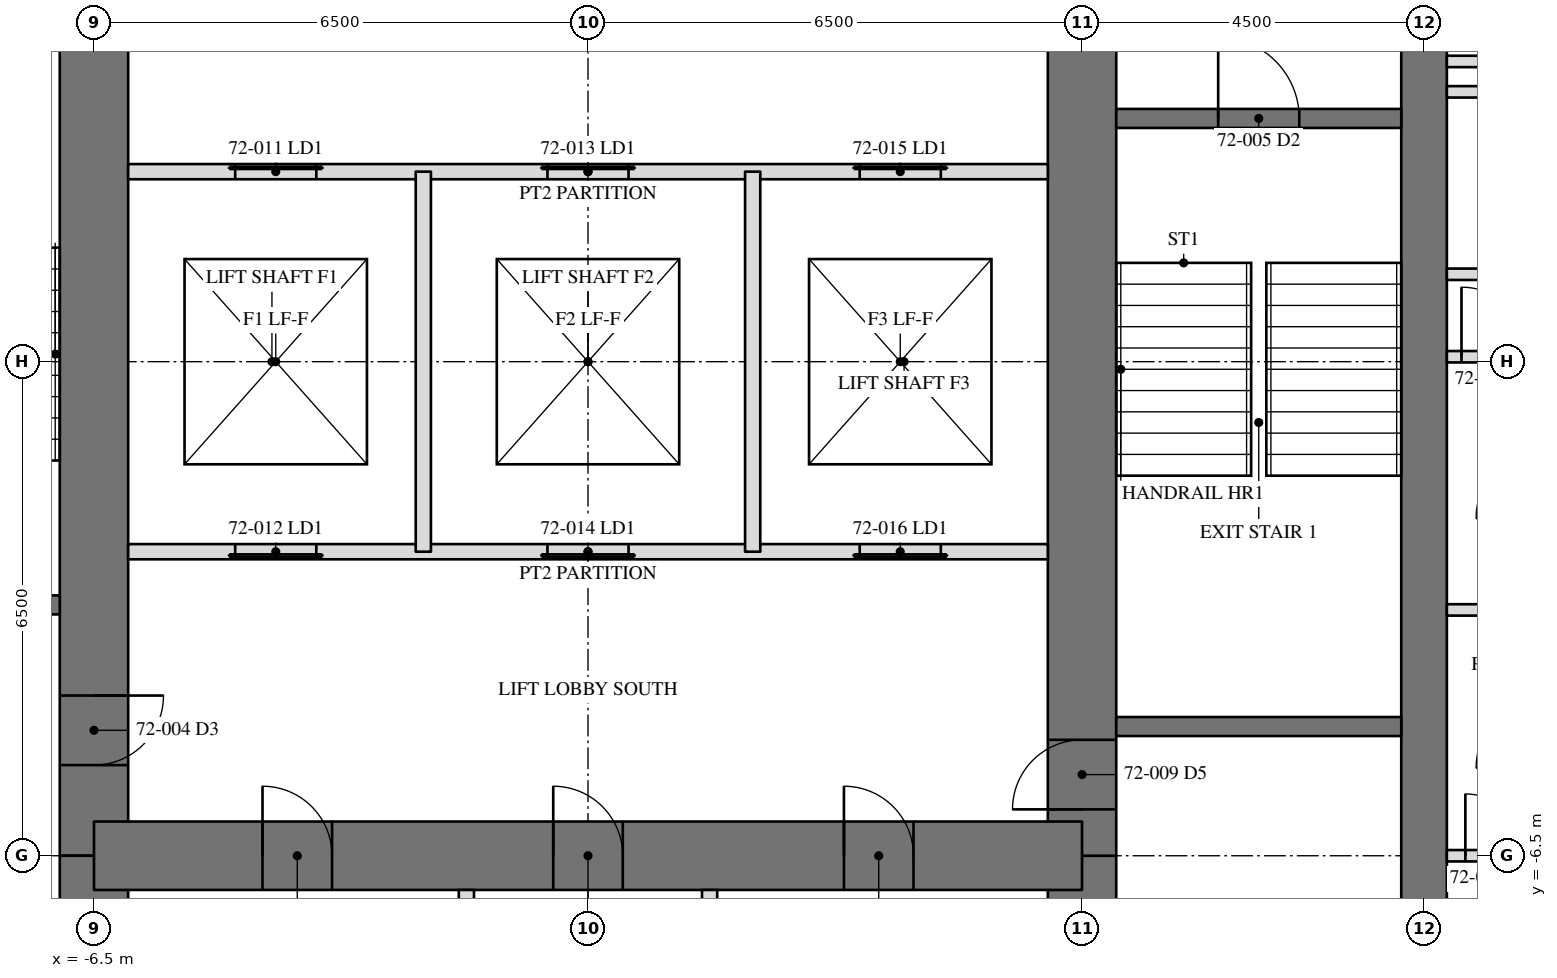
"""IFC4 building model, lengths in metres.
Left out: names, types, materials, properties, quantities, classifications, styles, units other than length and angle.
Written with IfcOpenShell. Run it as: python <this file> out.ifc"""

import sys

from ifc_helpers import new_model, si_unit, direction, frame, frame_2d, origin, place, context, subcontext, project, spatial, rectangle, extrude, element, fill, save


model = new_model("IFC4")
c1 = context("Model", 3, precision=1e-05, world=origin(), true_north=direction((0.0, 1.0)))
c2 = subcontext(c1, "Body", "Model", "MODEL_VIEW")
j1 = project(units=[si_unit("LENGTHUNIT", "METRE"), si_unit("PLANEANGLEUNIT", "RADIAN")], contexts=[c1])
p1 = place(None, origin())
s1 = spatial("IfcSite", under=j1, at=p1, CompositionType="ELEMENT")
p2 = place(p1, origin())
s2 = spatial("IfcBuilding", under=s1, at=p2, CompositionType="ELEMENT")
p3 = place(p2, frame((0.0, 0.0, 292.0)))
s3 = spatial("IfcBuildingStorey", under=s2, at=p3, CompositionType="ELEMENT", Elevation=292.0)
p4 = place(p3, frame((11.0, -11.0, 0.0), z_axis=(0.0, 0.0, 1.0), x_axis=(0.0, 1.0, 0.0)))
e1 = element("IfcWall", 1, at=p4, inside=s3, PredefinedType="SHEAR", context=c2, shape_type="SweptSolid", body=[
    extrude(rectangle(XDim=22.0, YDim=0.6, at=frame_2d((11.0, 0.0))), origin(), (0.0, 0.0, 1.0), 3.6),
])
p5 = place(p4, frame((15.393, 0.0, 0.0)))
e2 = element("IfcOpeningElement", 2, at=p5, cuts=e1, PredefinedType="OPENING", context=c2, shape_type="SweptSolid", body=[
    extrude(rectangle(XDim=0.915, YDim=2.134, at=frame_2d((0.458, 1.067))), frame((0.0, 0.31, 0.0), z_axis=(0.0, -1.0, 0.0), x_axis=(1.0, 0.0, 0.0)), (0.0, 0.0, 1.0), 0.62),
])
p6 = place(p3, frame((6.5, -11.0, 0.0), z_axis=(0.0, 0.0, 1.0), x_axis=(0.0, 1.0, 0.0)))
e3 = element("IfcWall", 3, at=p6, inside=s3, PredefinedType="SHEAR", context=c2, shape_type="SweptSolid", body=[
    extrude(rectangle(XDim=4.5, YDim=0.9, at=frame_2d((2.25, 0.0))), origin(), (0.0, 0.0, 1.0), 3.6),
])
p7 = place(p3, frame((6.5, -6.5, 0.0), z_axis=(0.0, 0.0, 1.0), x_axis=(0.0, 1.0, 0.0)))
e4 = element("IfcWall", 4, at=p7, inside=s3, PredefinedType="SHEAR", context=c2, shape_type="SweptSolid", body=[
    extrude(rectangle(XDim=13.0, YDim=0.9, at=frame_2d((6.5, 0.0))), origin(), (0.0, 0.0, 1.0), 3.6),
])
p8 = place(p7, frame((10.893, 0.0, 0.0)))
e5 = element("IfcOpeningElement", 5, at=p8, cuts=e4, PredefinedType="OPENING", context=c2, shape_type="SweptSolid", body=[
    extrude(rectangle(XDim=0.915, YDim=2.134, at=frame_2d((0.458, 1.067))), frame((0.0, 0.46, 0.0), z_axis=(0.0, -1.0, 0.0), x_axis=(1.0, 0.0, 0.0)), (0.0, 0.0, 1.0), 0.92),
])
p9 = place(p7, frame((0.61, 0.0, 0.0)))
e6 = element("IfcOpeningElement", 6, at=p9, cuts=e4, PredefinedType="OPENING", context=c2, shape_type="SweptSolid", body=[
    extrude(rectangle(XDim=0.915, YDim=2.134, at=frame_2d((0.458, 1.067))), frame((0.0, 0.46, 0.0), z_axis=(0.0, -1.0, 0.0), x_axis=(1.0, 0.0, 0.0)), (0.0, 0.0, 1.0), 0.92),
])
p10 = place(p3, frame((-6.5, 6.5, 0.0), z_axis=(0.0, 0.0, 1.0), x_axis=(0.0, -1.0, 0.0)))
e7 = element("IfcWall", 7, at=p10, inside=s3, PredefinedType="SHEAR", context=c2, shape_type="SweptSolid", body=[
    extrude(rectangle(XDim=13.0, YDim=0.9, at=frame_2d((6.5, 0.0))), origin(), (0.0, 0.0, 1.0), 3.6),
])
p11 = place(p10, frame((10.893, 0.0, 0.0)))
e8 = element("IfcOpeningElement", 8, at=p11, cuts=e7, PredefinedType="OPENING", context=c2, shape_type="SweptSolid", body=[
    extrude(rectangle(XDim=0.915, YDim=2.134, at=frame_2d((0.458, 1.067))), frame((0.0, 0.46, 0.0), z_axis=(0.0, -1.0, 0.0), x_axis=(1.0, 0.0, 0.0)), (0.0, 0.0, 1.0), 0.92),
])
p12 = place(p10, frame((0.61, 0.0, 0.0)))
e9 = element("IfcOpeningElement", 9, at=p12, cuts=e7, PredefinedType="OPENING", context=c2, shape_type="SweptSolid", body=[
    extrude(rectangle(XDim=0.915, YDim=2.134, at=frame_2d((0.458, 1.067))), frame((0.0, 0.46, 0.0), z_axis=(0.0, -1.0, 0.0), x_axis=(1.0, 0.0, 0.0)), (0.0, 0.0, 1.0), 0.92),
])
p13 = place(p3, frame((-6.5, -6.5, 0.0), z_axis=(0.0, 0.0, 1.0), x_axis=(0.0, -1.0, 0.0)))
e10 = element("IfcWall", 10, at=p13, inside=s3, PredefinedType="SHEAR", context=c2, shape_type="SweptSolid", body=[
    extrude(rectangle(XDim=4.5, YDim=0.9, at=frame_2d((2.25, 0.0))), origin(), (0.0, 0.0, 1.0), 3.6),
])
p14 = place(p3, frame((-6.5, -6.5, 0.0), z_axis=(0.0, 0.0, 1.0), x_axis=(1.0, 0.0, 0.0)))
e11 = element("IfcWall", 11, at=p14, inside=s3, PredefinedType="SHEAR", context=c2, shape_type="SweptSolid", body=[
    extrude(rectangle(XDim=13.0, YDim=0.9, at=frame_2d((6.5, 0.0))), origin(), (0.0, 0.0, 1.0), 3.6),
])
p15 = place(p14, frame((6.042, 0.0, 0.0)))
e12 = element("IfcOpeningElement", 12, at=p15, cuts=e11, PredefinedType="OPENING", context=c2, shape_type="SweptSolid", body=[
    extrude(rectangle(XDim=0.915, YDim=2.134, at=frame_2d((0.458, 1.067))), frame((0.0, 0.46, 0.0), z_axis=(0.0, -1.0, 0.0), x_axis=(1.0, 0.0, 0.0)), (0.0, 0.0, 1.0), 0.92),
])
p16 = place(p14, frame((2.218, 0.0, 0.0)))
e13 = element("IfcOpeningElement", 13, at=p16, cuts=e11, PredefinedType="OPENING", context=c2, shape_type="SweptSolid", body=[
    extrude(rectangle(XDim=0.915, YDim=2.134, at=frame_2d((0.458, 1.067))), frame((0.0, 0.46, 0.0), z_axis=(0.0, -1.0, 0.0), x_axis=(1.0, 0.0, 0.0)), (0.0, 0.0, 1.0), 0.92),
])
p17 = place(p14, frame((9.867, 0.0, 0.0)))
e14 = element("IfcOpeningElement", 14, at=p17, cuts=e11, PredefinedType="OPENING", context=c2, shape_type="SweptSolid", body=[
    extrude(rectangle(XDim=0.915, YDim=2.134, at=frame_2d((0.458, 1.067))), frame((0.0, 0.46, 0.0), z_axis=(0.0, -1.0, 0.0), x_axis=(1.0, 0.0, 0.0)), (0.0, 0.0, 1.0), 0.92),
])
p18 = place(p3, frame((6.95, -4.8, 0.0), z_axis=(0.0, 0.0, 1.0), x_axis=(1.0, 0.0, 0.0)))
e15 = element("IfcWall", 15, at=p18, inside=s3, PredefinedType="SOLIDWALL", context=c2, shape_type="SweptSolid", body=[
    extrude(rectangle(XDim=3.75, YDim=0.25, at=frame_2d((1.875, 0.0))), origin(), (0.0, 0.0, 1.0), 3.41),
])
p19 = place(p3, frame((6.95, 3.2, 0.0), z_axis=(0.0, 0.0, 1.0), x_axis=(1.0, 0.0, 0.0)))
e16 = element("IfcWall", 16, at=p19, inside=s3, PredefinedType="SOLIDWALL", context=c2, shape_type="SweptSolid", body=[
    extrude(rectangle(XDim=3.75, YDim=0.25, at=frame_2d((1.875, 0.0))), origin(), (0.0, 0.0, 1.0), 3.41),
])
p20 = place(p19, frame((1.342, 0.0, 0.0)))
e17 = element("IfcOpeningElement", 17, at=p20, cuts=e16, PredefinedType="OPENING", context=c2, shape_type="SweptSolid", body=[
    extrude(rectangle(XDim=1.067, YDim=2.134, at=frame_2d((0.533, 1.067))), frame((0.0, 0.135, 0.0), z_axis=(0.0, -1.0, 0.0), x_axis=(1.0, 0.0, 0.0)), (0.0, 0.0, 1.0), 0.27),
])
p21 = place(p3, frame((-6.95, -3.2, 0.0), z_axis=(0.0, 0.0, 1.0), x_axis=(-1.0, 0.0, 0.0)))
e18 = element("IfcWall", 18, at=p21, inside=s3, PredefinedType="SOLIDWALL", context=c2, shape_type="SweptSolid", body=[
    extrude(rectangle(XDim=3.75, YDim=0.25, at=frame_2d((1.875, 0.0))), origin(), (0.0, 0.0, 1.0), 3.41),
])
p22 = place(p21, frame((1.342, 0.0, 0.0)))
e19 = element("IfcOpeningElement", 19, at=p22, cuts=e18, PredefinedType="OPENING", context=c2, shape_type="SweptSolid", body=[
    extrude(rectangle(XDim=1.067, YDim=2.134, at=frame_2d((0.533, 1.067))), frame((0.0, 0.135, 0.0), z_axis=(0.0, -1.0, 0.0), x_axis=(1.0, 0.0, 0.0)), (0.0, 0.0, 1.0), 0.27),
])
p23 = place(p3, frame((-6.05, 2.5, 0.0), z_axis=(0.0, 0.0, 1.0), x_axis=(1.0, 0.0, 0.0)))
e20 = element("IfcWall", 20, at=p23, inside=s3, PredefinedType="PARTITIONING", context=c2, shape_type="SweptSolid", body=[
    extrude(rectangle(XDim=12.1, YDim=0.2, at=frame_2d((6.05, 0.0))), origin(), (0.0, 0.0, 1.0), 3.41),
])
p24 = place(p23, frame((1.408, 0.0, 0.0)))
e21 = element("IfcOpeningElement", 21, at=p24, cuts=e20, PredefinedType="OPENING", context=c2, shape_type="SweptSolid", body=[
    extrude(rectangle(XDim=1.067, YDim=2.134, at=frame_2d((0.533, 1.067))), frame((0.0, 0.11, 0.0), z_axis=(0.0, -1.0, 0.0), x_axis=(1.0, 0.0, 0.0)), (0.0, 0.0, 1.0), 0.22),
])
p25 = place(p23, frame((5.517, 0.0, 0.0)))
e22 = element("IfcOpeningElement", 22, at=p25, cuts=e20, PredefinedType="OPENING", context=c2, shape_type="SweptSolid", body=[
    extrude(rectangle(XDim=1.067, YDim=2.134, at=frame_2d((0.533, 1.067))), frame((0.0, 0.11, 0.0), z_axis=(0.0, -1.0, 0.0), x_axis=(1.0, 0.0, 0.0)), (0.0, 0.0, 1.0), 0.22),
])
p26 = place(p23, frame((9.625, 0.0, 0.0)))
e23 = element("IfcOpeningElement", 23, at=p26, cuts=e20, PredefinedType="OPENING", context=c2, shape_type="SweptSolid", body=[
    extrude(rectangle(XDim=1.067, YDim=2.134, at=frame_2d((0.533, 1.067))), frame((0.0, 0.11, 0.0), z_axis=(0.0, -1.0, 0.0), x_axis=(1.0, 0.0, 0.0)), (0.0, 0.0, 1.0), 0.22),
])
p27 = place(p3, frame((6.05, -2.5, 0.0), z_axis=(0.0, 0.0, 1.0), x_axis=(-1.0, 0.0, 0.0)))
e24 = element("IfcWall", 24, at=p27, inside=s3, PredefinedType="PARTITIONING", context=c2, shape_type="SweptSolid", body=[
    extrude(rectangle(XDim=12.1, YDim=0.2, at=frame_2d((6.05, 0.0))), origin(), (0.0, 0.0, 1.0), 3.41),
])
p28 = place(p27, frame((9.625, 0.0, 0.0)))
e25 = element("IfcOpeningElement", 25, at=p28, cuts=e24, PredefinedType="OPENING", context=c2, shape_type="SweptSolid", body=[
    extrude(rectangle(XDim=1.067, YDim=2.134, at=frame_2d((0.533, 1.067))), frame((0.0, 0.11, 0.0), z_axis=(0.0, -1.0, 0.0), x_axis=(1.0, 0.0, 0.0)), (0.0, 0.0, 1.0), 0.22),
])
p29 = place(p27, frame((5.517, 0.0, 0.0)))
e26 = element("IfcOpeningElement", 26, at=p29, cuts=e24, PredefinedType="OPENING", context=c2, shape_type="SweptSolid", body=[
    extrude(rectangle(XDim=1.067, YDim=2.134, at=frame_2d((0.533, 1.067))), frame((0.0, 0.11, 0.0), z_axis=(0.0, -1.0, 0.0), x_axis=(1.0, 0.0, 0.0)), (0.0, 0.0, 1.0), 0.22),
])
p30 = place(p27, frame((1.408, 0.0, 0.0)))
e27 = element("IfcOpeningElement", 27, at=p30, cuts=e24, PredefinedType="OPENING", context=c2, shape_type="SweptSolid", body=[
    extrude(rectangle(XDim=1.067, YDim=2.134, at=frame_2d((0.533, 1.067))), frame((0.0, 0.11, 0.0), z_axis=(0.0, -1.0, 0.0), x_axis=(1.0, 0.0, 0.0)), (0.0, 0.0, 1.0), 0.22),
])
for number, where, z_axis, x_axis in (
    (28, (-2.167, -2.5, 0.0), (0.0, 0.0, 1.0), (0.0, 1.0, 0.0)),
    (29, (2.167, -2.5, 0.0), (0.0, 0.0, 1.0), (0.0, 1.0, 0.0)),
):
    element("IfcWall", number, at=place(p3, frame(where, z_axis=z_axis, x_axis=x_axis)), inside=s3, PredefinedType="PARTITIONING", context=c2, shape_type="SweptSolid", body=[
        extrude(rectangle(XDim=5.0, YDim=0.2, at=frame_2d((2.5, 0.0))), origin(), (0.0, 0.0, 1.0), 3.41),
    ])
for number, where, z_axis, x_axis in (
    (30, (-1.6, -6.95, 0.0), (0.0, 0.0, 1.0), (0.0, -1.0, 0.0)),
    (31, (1.6, -6.95, 0.0), (0.0, 0.0, 1.0), (0.0, -1.0, 0.0)),
):
    element("IfcWall", number, at=place(p3, frame(where, z_axis=z_axis, x_axis=x_axis)), inside=s3, PredefinedType="PARTITIONING", context=c2, shape_type="SweptSolid", body=[
        extrude(rectangle(XDim=3.75, YDim=0.2, at=frame_2d((1.875, 0.0))), origin(), (0.0, 0.0, 1.0), 3.41),
    ])
p31 = place(p3, frame((11.3, -6.5, 0.0), z_axis=(0.0, 0.0, 1.0), x_axis=(1.0, 0.0, 0.0)))
e32 = element("IfcWall", 32, at=p31, inside=s3, PredefinedType="PARTITIONING", context=c2, shape_type="SweptSolid", body=[
    extrude(rectangle(XDim=5.615, YDim=0.15, at=frame_2d((2.808, 0.0))), origin(), (0.0, 0.0, 1.0), 2.966),
])
p32 = place(p31, frame((0.243, 0.0, 0.0)))
e33 = element("IfcOpeningElement", 33, at=p32, cuts=e32, PredefinedType="OPENING", context=c2, shape_type="SweptSolid", body=[
    extrude(rectangle(XDim=0.813, YDim=2.032, at=frame_2d((0.406, 1.016))), frame((0.0, 0.085, 0.0), z_axis=(0.0, -1.0, 0.0), x_axis=(1.0, 0.0, 0.0)), (0.0, 0.0, 1.0), 0.17),
])
p33 = place(p31, frame((2.742, 0.0, 0.0)))
e34 = element("IfcOpeningElement", 34, at=p33, cuts=e32, PredefinedType="OPENING", context=c2, shape_type="SweptSolid", body=[
    extrude(rectangle(XDim=0.915, YDim=2.134, at=frame_2d((0.458, 1.067))), frame((0.0, 0.085, 0.0), z_axis=(0.0, -1.0, 0.0), x_axis=(1.0, 0.0, 0.0)), (0.0, 0.0, 1.0), 0.17),
])
p34 = place(p3, frame((11.3, -3.266, 0.0), z_axis=(0.0, 0.0, 1.0), x_axis=(1.0, 0.0, 0.0)))
e35 = element("IfcWall", 35, at=p34, inside=s3, PredefinedType="PARTITIONING", context=c2, shape_type="SweptSolid", body=[
    extrude(rectangle(XDim=5.615, YDim=0.15, at=frame_2d((2.808, 0.0))), origin(), (0.0, 0.0, 1.0), 2.709),
])
p35 = place(p3, frame((11.3, 0.065, 0.0), z_axis=(0.0, 0.0, 1.0), x_axis=(1.0, 0.0, 0.0)))
e36 = element("IfcWall", 36, at=p35, inside=s3, PredefinedType="PARTITIONING", context=c2, shape_type="SweptSolid", body=[
    extrude(rectangle(XDim=5.615, YDim=0.15, at=frame_2d((2.808, 0.0))), origin(), (0.0, 0.0, 1.0), 2.709),
])
p36 = place(p35, frame((0.192, 0.0, 0.0)))
e37 = element("IfcOpeningElement", 37, at=p36, cuts=e36, PredefinedType="OPENING", context=c2, shape_type="SweptSolid", body=[
    extrude(rectangle(XDim=0.915, YDim=2.134, at=frame_2d((0.458, 1.067))), frame((0.0, 0.085, 0.0), z_axis=(0.0, -1.0, 0.0), x_axis=(1.0, 0.0, 0.0)), (0.0, 0.0, 1.0), 0.17),
])
p37 = place(p3, frame((11.3, 3.95, 0.0), z_axis=(0.0, 0.0, 1.0), x_axis=(1.0, 0.0, 0.0)))
e38 = element("IfcWall", 38, at=p37, inside=s3, PredefinedType="PARTITIONING", context=c2, shape_type="SweptSolid", body=[
    extrude(rectangle(XDim=1.525, YDim=0.15, at=frame_2d((0.762, 0.0))), origin(), (0.0, 0.0, 1.0), 3.41),
])
for number, where, z_axis, x_axis in (
    (39, (11.3, 1.15, 0.0), (0.0, 0.0, 1.0), (1.0, 0.0, 0.0)),
    (40, (11.3, 3.55, 0.0), (0.0, 0.0, 1.0), (1.0, 0.0, 0.0)),
):
    element("IfcWall", number, at=place(p3, frame(where, z_axis=z_axis, x_axis=x_axis)), inside=s3, PredefinedType="PARTITIONING", context=c2, shape_type="SweptSolid", body=[
        extrude(rectangle(XDim=2.725, YDim=0.15, at=frame_2d((1.362, 0.0))), origin(), (0.0, 0.0, 1.0), 3.41),
    ])
p38 = place(p11, origin())
e41 = element("IfcDoor", 41, at=p38, inside=s3, OperationType="SINGLE_SWING_RIGHT", PredefinedType="DOOR", context=c2, shape_type="SweptSolid", body=[
    extrude(rectangle(XDim=0.915, YDim=2.134, at=frame_2d((0.458, 1.067))), frame((0.0, -0.375, 0.0), z_axis=(0.0, -1.0, 0.0), x_axis=(1.0, 0.0, 0.0)), (0.0, 0.0, 1.0), 0.05),
])
fill(e8, e41)
p39 = place(p20, origin())
e42 = element("IfcDoor", 42, at=p39, inside=s3, OperationType="SINGLE_SWING_LEFT", PredefinedType="DOOR", context=c2, shape_type="SweptSolid", body=[
    extrude(rectangle(XDim=1.067, YDim=2.134, at=frame_2d((0.533, 1.067))), frame((0.0, 0.025, 0.0), z_axis=(0.0, -1.0, 0.0), x_axis=(1.0, 0.0, 0.0)), (0.0, 0.0, 1.0), 0.05),
])
fill(e17, e42)
p40 = place(p9, origin())
e43 = element("IfcDoor", 43, at=p40, inside=s3, OperationType="SINGLE_SWING_RIGHT", PredefinedType="DOOR", context=c2, shape_type="SweptSolid", body=[
    extrude(rectangle(XDim=0.915, YDim=2.134, at=frame_2d((0.458, 1.067))), frame((0.0, -0.375, 0.0), z_axis=(0.0, -1.0, 0.0), x_axis=(1.0, 0.0, 0.0)), (0.0, 0.0, 1.0), 0.05),
])
fill(e6, e43)
p41 = place(p24, origin())
e44 = element("IfcDoor", 44, at=p41, inside=s3, OperationType="SLIDING_TO_LEFT", PredefinedType="DOOR", context=c2, shape_type="SweptSolid", body=[
    extrude(rectangle(XDim=1.067, YDim=2.134, at=frame_2d((0.533, 1.067))), frame((0.0, 0.025, 0.0), z_axis=(0.0, -1.0, 0.0), x_axis=(1.0, 0.0, 0.0)), (0.0, 0.0, 1.0), 0.05),
])
fill(e21, e44)
p42 = place(p28, origin())
e45 = element("IfcDoor", 45, at=p42, inside=s3, OperationType="SLIDING_TO_LEFT", PredefinedType="DOOR", context=c2, shape_type="SweptSolid", body=[
    extrude(rectangle(XDim=1.067, YDim=2.134, at=frame_2d((0.533, 1.067))), frame((0.0, 0.025, 0.0), z_axis=(0.0, -1.0, 0.0), x_axis=(1.0, 0.0, 0.0)), (0.0, 0.0, 1.0), 0.05),
])
fill(e25, e45)
p43 = place(p25, origin())
e46 = element("IfcDoor", 46, at=p43, inside=s3, OperationType="SLIDING_TO_LEFT", PredefinedType="DOOR", context=c2, shape_type="SweptSolid", body=[
    extrude(rectangle(XDim=1.067, YDim=2.134, at=frame_2d((0.533, 1.067))), frame((0.0, 0.025, 0.0), z_axis=(0.0, -1.0, 0.0), x_axis=(1.0, 0.0, 0.0)), (0.0, 0.0, 1.0), 0.05),
])
fill(e22, e46)
p44 = place(p29, origin())
e47 = element("IfcDoor", 47, at=p44, inside=s3, OperationType="SLIDING_TO_LEFT", PredefinedType="DOOR", context=c2, shape_type="SweptSolid", body=[
    extrude(rectangle(XDim=1.067, YDim=2.134, at=frame_2d((0.533, 1.067))), frame((0.0, 0.025, 0.0), z_axis=(0.0, -1.0, 0.0), x_axis=(1.0, 0.0, 0.0)), (0.0, 0.0, 1.0), 0.05),
])
fill(e26, e47)
p45 = place(p26, origin())
e48 = element("IfcDoor", 48, at=p45, inside=s3, OperationType="SLIDING_TO_LEFT", PredefinedType="DOOR", context=c2, shape_type="SweptSolid", body=[
    extrude(rectangle(XDim=1.067, YDim=2.134, at=frame_2d((0.533, 1.067))), frame((0.0, 0.025, 0.0), z_axis=(0.0, -1.0, 0.0), x_axis=(1.0, 0.0, 0.0)), (0.0, 0.0, 1.0), 0.05),
])
fill(e23, e48)
p46 = place(p30, origin())
e49 = element("IfcDoor", 49, at=p46, inside=s3, OperationType="SLIDING_TO_LEFT", PredefinedType="DOOR", context=c2, shape_type="SweptSolid", body=[
    extrude(rectangle(XDim=1.067, YDim=2.134, at=frame_2d((0.533, 1.067))), frame((0.0, 0.025, 0.0), z_axis=(0.0, -1.0, 0.0), x_axis=(1.0, 0.0, 0.0)), (0.0, 0.0, 1.0), 0.05),
])
fill(e27, e49)
p47 = place(p15, origin())
e50 = element("IfcDoor", 50, at=p47, inside=s3, OperationType="SINGLE_SWING_RIGHT", PredefinedType="DOOR", context=c2, shape_type="SweptSolid", body=[
    extrude(rectangle(XDim=0.915, YDim=2.134, at=frame_2d((0.458, 1.067))), frame((0.0, -0.375, 0.0), z_axis=(0.0, -1.0, 0.0), x_axis=(1.0, 0.0, 0.0)), (0.0, 0.0, 1.0), 0.05),
])
fill(e12, e50)
p48 = place(p16, origin())
e51 = element("IfcDoor", 51, at=p48, inside=s3, OperationType="SINGLE_SWING_RIGHT", PredefinedType="DOOR", context=c2, shape_type="SweptSolid", body=[
    extrude(rectangle(XDim=0.915, YDim=2.134, at=frame_2d((0.458, 1.067))), frame((0.0, -0.375, 0.0), z_axis=(0.0, -1.0, 0.0), x_axis=(1.0, 0.0, 0.0)), (0.0, 0.0, 1.0), 0.05),
])
fill(e13, e51)
p49 = place(p17, origin())
e52 = element("IfcDoor", 52, at=p49, inside=s3, OperationType="SINGLE_SWING_RIGHT", PredefinedType="DOOR", context=c2, shape_type="SweptSolid", body=[
    extrude(rectangle(XDim=0.915, YDim=2.134, at=frame_2d((0.458, 1.067))), frame((0.0, -0.375, 0.0), z_axis=(0.0, -1.0, 0.0), x_axis=(1.0, 0.0, 0.0)), (0.0, 0.0, 1.0), 0.05),
])
fill(e14, e52)
p50 = place(p36, origin())
e53 = element("IfcDoor", 53, at=p50, inside=s3, OperationType="SINGLE_SWING_LEFT", PredefinedType="DOOR", context=c2, shape_type="SweptSolid", body=[
    extrude(rectangle(XDim=0.915, YDim=2.134, at=frame_2d((0.458, 1.067))), frame((0.0, 0.025, 0.0), z_axis=(0.0, -1.0, 0.0), x_axis=(1.0, 0.0, 0.0)), (0.0, 0.0, 1.0), 0.05),
])
fill(e37, e53)
p51 = place(p32, origin())
e54 = element("IfcDoor", 54, at=p51, inside=s3, OperationType="SINGLE_SWING_LEFT", PredefinedType="DOOR", context=c2, shape_type="SweptSolid", body=[
    extrude(rectangle(XDim=0.813, YDim=2.032, at=frame_2d((0.406, 1.016))), frame((0.0, 0.025, 0.0), z_axis=(0.0, -1.0, 0.0), x_axis=(1.0, 0.0, 0.0)), (0.0, 0.0, 1.0), 0.05),
])
fill(e33, e54)
save(model, sys.argv[1])
